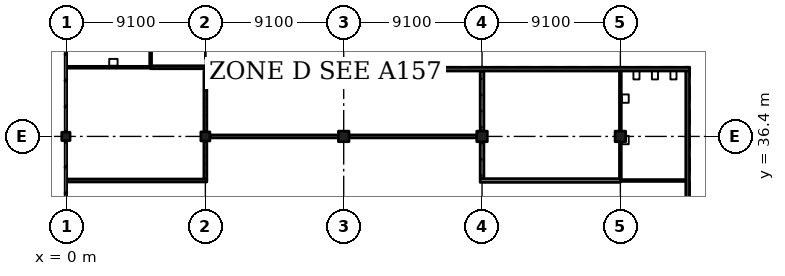
"""IFC4 building model, lengths in metres.
Left out: names, types, materials, properties, quantities, classifications, styles, units other than length and angle.
Written with IfcOpenShell. Run it as: python <this file> out.ifc"""

import sys

from ifc_helpers import new_model, si_unit, direction, frame, frame_2d, origin, origin_2d, place, context, subcontext, project, spatial, rectangle, extrude, element, fill, save


model = new_model("IFC4")
c1 = context("Model", 3, precision=1e-05, world=origin(), true_north=direction((0.0, 1.0)))
c2 = subcontext(c1, "Body", "Model", "MODEL_VIEW")
j1 = project(units=[si_unit("LENGTHUNIT", "METRE"), si_unit("PLANEANGLEUNIT", "RADIAN")], contexts=[c1])
p1 = place(None, origin())
s1 = spatial("IfcSite", under=j1, at=p1, CompositionType="ELEMENT")
p2 = place(p1, origin())
s2 = spatial("IfcBuilding", under=s1, at=p2, CompositionType="ELEMENT")
p3 = place(p2, frame((0.0, 0.0, 20.02)))
s3 = spatial("IfcBuildingStorey", under=s2, at=p3, CompositionType="ELEMENT", Elevation=20.02)
p4 = place(p3, frame((-0.075, 36.4, 0.0), z_axis=(0.0, 0.0, 1.0), x_axis=(1.0, 0.0, 0.0)))
e1 = element("IfcColumn", 1, at=p4, inside=s3, PredefinedType="COLUMN", context=c2, shape_type="SweptSolid", body=[
    extrude(rectangle(XDim=0.55, YDim=0.55, at=origin_2d()), origin(), (0.0, 0.0, 1.0), 4.55),
])
p5 = place(p3, frame((9.1, 36.4, 0.0), z_axis=(0.0, 0.0, 1.0), x_axis=(1.0, 0.0, 0.0)))
e2 = element("IfcColumn", 2, at=p5, inside=s3, PredefinedType="COLUMN", context=c2, shape_type="SweptSolid", body=[
    extrude(rectangle(XDim=0.6, YDim=0.6, at=origin_2d()), origin(), (0.0, 0.0, 1.0), 4.55),
])
for number, where, z_axis, x_axis in (
    (3, (18.2, 36.4, 0.0), (0.0, 0.0, 1.0), (1.0, 0.0, 0.0)),
    (4, (27.3, 36.4, 0.0), (0.0, 0.0, 1.0), (1.0, 0.0, 0.0)),
    (5, (36.4, 36.4, 0.0), (0.0, 0.0, 1.0), (1.0, 0.0, 0.0)),
):
    element("IfcColumn", number, at=place(p3, frame(where, z_axis=z_axis, x_axis=x_axis)), inside=s3, PredefinedType="COLUMN", context=c2, shape_type="SweptSolid", body=[
        extrude(rectangle(XDim=0.7, YDim=0.7, at=origin_2d()), origin(), (0.0, 0.0, 1.0), 4.55),
    ])
for number, where, z_axis, x_axis in (
    (6, (40.825, 40.95, 0.0), (0.0, 0.0, 1.0), (0.0, -1.0, 0.0)),
    (7, (40.95, 40.825, 0.0), (0.0, 0.0, 1.0), (-1.0, 0.0, 0.0)),
):
    element("IfcWall", number, at=place(p3, frame(where, z_axis=z_axis, x_axis=x_axis)), inside=s3, PredefinedType="SHEAR", context=c2, shape_type="SweptSolid", body=[
        extrude(rectangle(XDim=31.85, YDim=0.25, at=frame_2d((15.925, 0.0))), origin(), (0.0, 0.0, 1.0), 4.55),
    ])
p6 = place(p3, frame((0.03, 33.5, 0.0), z_axis=(0.0, 0.0, 1.0), x_axis=(1.0, 0.0, 0.0)))
e8 = element("IfcWall", 8, at=p6, inside=s3, PredefinedType="PARTITIONING", context=c2, shape_type="SweptSolid", body=[
    extrude(rectangle(XDim=9.17, YDim=0.2, at=frame_2d((4.585, 0.0))), origin(), (0.0, 0.0, 1.0), 4.25),
])
p7 = place(p6, frame((1.05, 0.0, 0.0)))
e9 = element("IfcOpeningElement", 9, at=p7, cuts=e8, PredefinedType="OPENING", context=c2, shape_type="SweptSolid", body=[
    extrude(rectangle(XDim=2.4, YDim=2.4, at=frame_2d((1.2, 1.2))), frame((0.0, 0.11, 0.0), z_axis=(0.0, -1.0, 0.0), x_axis=(1.0, 0.0, 0.0)), (0.0, 0.0, 1.0), 0.22),
])
p8 = place(p6, frame((5.65, 0.0, 0.0)))
e10 = element("IfcOpeningElement", 10, at=p8, cuts=e8, PredefinedType="OPENING", context=c2, shape_type="SweptSolid", body=[
    extrude(rectangle(XDim=2.4, YDim=2.4, at=frame_2d((1.2, 1.2))), frame((0.0, 0.11, 0.0), z_axis=(0.0, -1.0, 0.0), x_axis=(1.0, 0.0, 0.0)), (0.0, 0.0, 1.0), 0.22),
])
p9 = place(p3, frame((0.03, 40.95, 0.0), z_axis=(0.0, 0.0, 1.0), x_axis=(1.0, 0.0, 0.0)))
e11 = element("IfcWall", 11, at=p9, inside=s3, PredefinedType="PARTITIONING", context=c2, shape_type="SweptSolid", body=[
    extrude(rectangle(XDim=5.47, YDim=0.125, at=frame_2d((2.735, 0.0))), origin(), (0.0, 0.0, 1.0), 4.25),
])
p10 = place(p3, frame((5.5, 40.95, 0.0), z_axis=(0.0, 0.0, 1.0), x_axis=(1.0, 0.0, 0.0)))
e12 = element("IfcWall", 12, at=p10, inside=s3, PredefinedType="PARTITIONING", context=c2, shape_type="SweptSolid", body=[
    extrude(rectangle(XDim=3.57, YDim=0.2, at=frame_2d((1.785, 0.0))), origin(), (0.0, 0.0, 1.0), 4.25),
])
p11 = place(p10, frame((0.55, 0.0, 0.0)))
e13 = element("IfcOpeningElement", 13, at=p11, cuts=e12, PredefinedType="OPENING", context=c2, shape_type="SweptSolid", body=[
    extrude(rectangle(XDim=2.4, YDim=2.4, at=frame_2d((1.2, 1.2))), frame((0.0, 0.11, 0.0), z_axis=(0.0, -1.0, 0.0), x_axis=(1.0, 0.0, 0.0)), (0.0, 0.0, 1.0), 0.22),
])
p12 = place(p3, frame((5.5, 41.05, 0.0), z_axis=(0.0, 0.0, 1.0), x_axis=(0.0, 1.0, 0.0)))
e14 = element("IfcWall", 14, at=p12, inside=s3, PredefinedType="PARTITIONING", context=c2, shape_type="SweptSolid", body=[
    extrude(rectangle(XDim=4.45, YDim=0.125, at=frame_2d((2.225, 0.0))), origin(), (0.0, 0.0, 1.0), 4.25),
])
p13 = place(p12, frame((1.75, 0.0, 0.0)))
e15 = element("IfcOpeningElement", 15, at=p13, cuts=e14, PredefinedType="OPENING", context=c2, shape_type="SweptSolid", body=[
    extrude(rectangle(XDim=1.0, YDim=2.1, at=frame_2d((0.5, 1.05))), frame((0.0, 0.073, 0.0), z_axis=(0.0, -1.0, 0.0), x_axis=(1.0, 0.0, 0.0)), (0.0, 0.0, 1.0), 0.145),
])
p14 = place(p3, frame((9.1, 33.6, 0.0), z_axis=(0.0, 0.0, 1.0), x_axis=(0.0, 1.0, 0.0)))
e16 = element("IfcWall", 16, at=p14, inside=s3, PredefinedType="PARTITIONING", context=c2, shape_type="SweptSolid", body=[
    extrude(rectangle(XDim=2.5, YDim=0.2, at=frame_2d((1.25, 0.0))), origin(), (0.0, 0.0, 1.0), 3.5),
])
p15 = place(p3, frame((9.1, 36.7, 0.0), z_axis=(0.0, 0.0, 1.0), x_axis=(0.0, 1.0, 0.0)))
e17 = element("IfcWall", 17, at=p15, inside=s3, PredefinedType="PARTITIONING", context=c2, shape_type="SweptSolid", body=[
    extrude(rectangle(XDim=4.0, YDim=0.2, at=frame_2d((2.0, 0.0))), origin(), (0.0, 0.0, 1.0), 3.25),
])
p16 = place(p3, frame((17.85, 36.4, 0.0), z_axis=(0.0, 0.0, 1.0), x_axis=(-1.0, 0.0, 0.0)))
e18 = element("IfcWall", 18, at=p16, inside=s3, PredefinedType="PARTITIONING", context=c2, shape_type="SweptSolid", body=[
    extrude(rectangle(XDim=8.45, YDim=0.2, at=frame_2d((4.225, 0.0))), origin(), (0.0, 0.0, 1.0), 3.5),
])
p17 = place(p16, frame((3.75, 0.0, 0.0)))
e19 = element("IfcOpeningElement", 19, at=p17, cuts=e18, PredefinedType="OPENING", context=c2, shape_type="SweptSolid", body=[
    extrude(rectangle(XDim=1.0, YDim=2.1, at=frame_2d((0.5, 1.05))), frame((0.0, 0.11, 0.0), z_axis=(0.0, -1.0, 0.0), x_axis=(1.0, 0.0, 0.0)), (0.0, 0.0, 1.0), 0.22),
])
p18 = place(p3, frame((26.95, 36.4, 0.0), z_axis=(0.0, 0.0, 1.0), x_axis=(-1.0, 0.0, 0.0)))
e20 = element("IfcWall", 20, at=p18, inside=s3, PredefinedType="PARTITIONING", context=c2, shape_type="SweptSolid", body=[
    extrude(rectangle(XDim=8.4, YDim=0.2, at=frame_2d((4.2, 0.0))), origin(), (0.0, 0.0, 1.0), 3.55),
])
p19 = place(p3, frame((27.3, 33.625, 0.0), z_axis=(0.0, 0.0, 1.0), x_axis=(0.0, 1.0, 0.0)))
e21 = element("IfcWall", 21, at=p19, inside=s3, PredefinedType="SOLIDWALL", context=c2, shape_type="SweptSolid", body=[
    extrude(rectangle(XDim=2.425, YDim=0.25, at=frame_2d((1.212, 0.0))), origin(), (0.0, 0.0, 1.0), 3.5),
])
p20 = place(p3, frame((27.3, 40.7, 0.0), z_axis=(0.0, 0.0, 1.0), x_axis=(0.0, -1.0, 0.0)))
e22 = element("IfcWall", 22, at=p20, inside=s3, PredefinedType="SOLIDWALL", context=c2, shape_type="SweptSolid", body=[
    extrude(rectangle(XDim=3.95, YDim=0.25, at=frame_2d((1.975, 0.0))), origin(), (0.0, 0.0, 1.0), 4.25),
])
p21 = place(p3, frame((36.4, 33.5, 0.0), z_axis=(0.0, 0.0, 1.0), x_axis=(-1.0, 0.0, 0.0)))
e23 = element("IfcWall", 23, at=p21, inside=s3, PredefinedType="SOLIDWALL", context=c2, shape_type="SweptSolid", body=[
    extrude(rectangle(XDim=9.225, YDim=0.25, at=frame_2d((4.612, 0.0))), origin(), (0.0, 0.0, 1.0), 4.25),
])
p22 = place(p21, frame((4.15, 0.0, 0.0)))
e24 = element("IfcOpeningElement", 24, at=p22, cuts=e23, PredefinedType="OPENING", context=c2, shape_type="SweptSolid", body=[
    extrude(rectangle(XDim=1.0, YDim=2.1, at=frame_2d((0.5, 1.05))), frame((0.0, 0.135, 0.0), z_axis=(0.0, -1.0, 0.0), x_axis=(1.0, 0.0, 0.0)), (0.0, 0.0, 1.0), 0.27),
])
p23 = place(p3, frame((36.4, 36.05, 0.0), z_axis=(0.0, 0.0, 1.0), x_axis=(0.0, -1.0, 0.0)))
e25 = element("IfcWall", 25, at=p23, inside=s3, PredefinedType="PARTITIONING", context=c2, shape_type="SweptSolid", body=[
    extrude(rectangle(XDim=2.425, YDim=0.125, at=frame_2d((1.212, 0.0))), origin(), (0.0, 0.0, 1.0), 3.5),
])
p24 = place(p3, frame((36.4, 40.7, 0.0), z_axis=(0.0, 0.0, 1.0), x_axis=(0.0, -1.0, 0.0)))
e26 = element("IfcWall", 26, at=p24, inside=s3, PredefinedType="PARTITIONING", context=c2, shape_type="SweptSolid", body=[
    extrude(rectangle(XDim=3.95, YDim=0.125, at=frame_2d((1.975, 0.0))), origin(), (0.0, 0.0, 1.0), 4.25),
])
p25 = place(p3, frame((40.7, 33.5, 0.0), z_axis=(0.0, 0.0, 1.0), x_axis=(-1.0, 0.0, 0.0)))
e27 = element("IfcWall", 27, at=p25, inside=s3, PredefinedType="PARTITIONING", context=c2, shape_type="SweptSolid", body=[
    extrude(rectangle(XDim=4.3, YDim=0.125, at=frame_2d((2.15, 0.0))), origin(), (0.0, 0.0, 1.0), 4.25),
])
p26 = place(p25, frame((1.75, 0.0, 0.0)))
e28 = element("IfcOpeningElement", 28, at=p26, cuts=e27, PredefinedType="OPENING", context=c2, shape_type="SweptSolid", body=[
    extrude(rectangle(XDim=0.9, YDim=2.1, at=frame_2d((0.45, 1.05))), frame((0.0, 0.073, 0.0), z_axis=(0.0, -1.0, 0.0), x_axis=(1.0, 0.0, 0.0)), (0.0, 0.0, 1.0), 0.145),
])
p27 = place(p17, origin())
e29 = element("IfcDoor", 29, at=p27, inside=s3, OperationType="SINGLE_SWING_RIGHT", PredefinedType="DOOR", context=c2, shape_type="SweptSolid", body=[
    extrude(rectangle(XDim=1.0, YDim=2.1, at=frame_2d((0.5, 1.05))), frame((0.0, 0.025, 0.0), z_axis=(0.0, -1.0, 0.0), x_axis=(1.0, 0.0, 0.0)), (0.0, 0.0, 1.0), 0.05),
])
fill(e19, e29)
p28 = place(p22, origin())
e30 = element("IfcDoor", 30, at=p28, inside=s3, OperationType="SINGLE_SWING_RIGHT", PredefinedType="DOOR", context=c2, shape_type="SweptSolid", body=[
    extrude(rectangle(XDim=1.0, YDim=2.1, at=frame_2d((0.5, 1.05))), frame((0.0, 0.025, 0.0), z_axis=(0.0, -1.0, 0.0), x_axis=(1.0, 0.0, 0.0)), (0.0, 0.0, 1.0), 0.05),
])
fill(e24, e30)
p29 = place(p26, origin())
e31 = element("IfcDoor", 31, at=p29, inside=s3, OperationType="SINGLE_SWING_RIGHT", PredefinedType="DOOR", context=c2, shape_type="SweptSolid", body=[
    extrude(rectangle(XDim=0.9, YDim=2.1, at=frame_2d((0.45, 1.05))), frame((0.0, 0.025, 0.0), z_axis=(0.0, -1.0, 0.0), x_axis=(1.0, 0.0, 0.0)), (0.0, 0.0, 1.0), 0.05),
])
fill(e28, e31)
p30 = place(p7, origin())
e32 = element("IfcDoor", 32, at=p30, inside=s3, OperationType="DOUBLE_DOOR_SINGLE_SWING", PredefinedType="DOOR", context=c2, shape_type="SweptSolid", body=[
    extrude(rectangle(XDim=2.4, YDim=2.4, at=frame_2d((1.2, 1.2))), frame((0.0, 0.025, 0.0), z_axis=(0.0, -1.0, 0.0), x_axis=(1.0, 0.0, 0.0)), (0.0, 0.0, 1.0), 0.05),
])
fill(e9, e32)
p31 = place(p8, origin())
e33 = element("IfcDoor", 33, at=p31, inside=s3, OperationType="DOUBLE_DOOR_SINGLE_SWING", PredefinedType="DOOR", context=c2, shape_type="SweptSolid", body=[
    extrude(rectangle(XDim=2.4, YDim=2.4, at=frame_2d((1.2, 1.2))), frame((0.0, 0.025, 0.0), z_axis=(0.0, -1.0, 0.0), x_axis=(1.0, 0.0, 0.0)), (0.0, 0.0, 1.0), 0.05),
])
fill(e10, e33)
p32 = place(p11, origin())
e34 = element("IfcDoor", 34, at=p32, inside=s3, OperationType="DOUBLE_DOOR_SINGLE_SWING", PredefinedType="DOOR", context=c2, shape_type="SweptSolid", body=[
    extrude(rectangle(XDim=2.4, YDim=2.4, at=frame_2d((1.2, 1.2))), frame((0.0, 0.025, 0.0), z_axis=(0.0, -1.0, 0.0), x_axis=(1.0, 0.0, 0.0)), (0.0, 0.0, 1.0), 0.05),
])
fill(e13, e34)
save(model, sys.argv[1])
